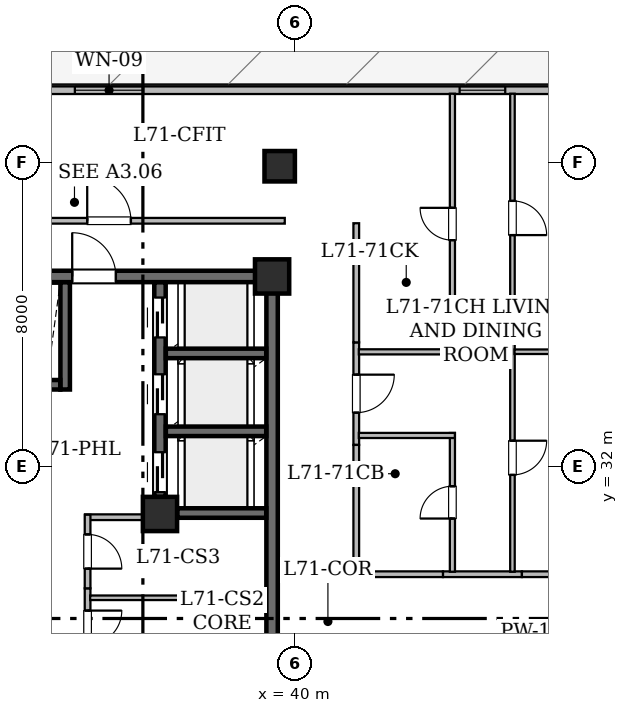
"""IFC4 building model, lengths in metres.
Left out: names, types, materials, properties, quantities, classifications, styles, units other than length and angle.
Written with IfcOpenShell. Run it as: python <this file> out.ifc"""

import sys

from ifc_helpers import new_model, si_unit, direction, frame, frame_2d, origin, origin_2d, place, context, subcontext, project, spatial, rectangle, hollow_rectangle, extrude, element, fill, save


model = new_model("IFC4")
c1 = context("Model", 3, precision=1e-05, world=origin(), true_north=direction((0.0, 1.0)))
c2 = subcontext(c1, "Body", "Model", "MODEL_VIEW")
j1 = project(units=[si_unit("LENGTHUNIT", "METRE"), si_unit("PLANEANGLEUNIT", "RADIAN")], contexts=[c1])
p1 = place(None, origin())
s1 = spatial("IfcSite", under=j1, at=p1, CompositionType="ELEMENT")
p2 = place(p1, origin())
s2 = spatial("IfcBuilding", under=s1, at=p2, CompositionType="ELEMENT")
p3 = place(p2, frame((0.0, 0.0, 277.85)))
s3 = spatial("IfcBuildingStorey", under=s2, at=p3, CompositionType="ELEMENT", Elevation=277.85)
for number, where, z_axis, x_axis in (
    (1, (36.45, 30.75, 0.0), (0.0, 0.0, 1.0), (1.0, 0.0, 0.0)),
    (2, (39.4, 37.0, 0.0), (0.0, 0.0, 1.0), (1.0, 0.0, 0.0)),
):
    element("IfcColumn", number, at=place(p3, frame(where, z_axis=z_axis, x_axis=x_axis)), inside=s3, PredefinedType="COLUMN", context=c2, shape_type="SweptSolid", body=[
        extrude(hollow_rectangle(XDim=0.9, YDim=0.9, WallThickness=0.045, at=origin_2d()), origin(), (0.0, 0.0, 1.0), 4.2),
    ])
p4 = place(p3, frame((39.6, 39.9, 0.025), z_axis=(0.0, 0.0, 1.0), x_axis=(1.0, 0.0, 0.0)))
e3 = element("IfcColumn", 3, at=p4, inside=s3, PredefinedType="COLUMN", context=c2, shape_type="SweptSolid", body=[
    extrude(hollow_rectangle(XDim=0.8, YDim=0.8, WallThickness=0.04, at=origin_2d()), origin(), (0.0, 0.0, 1.0), 4.175),
])
p5 = place(p3, frame((27.102, 41.9, 0.0), z_axis=(0.0, 0.0, 1.0), x_axis=(1.0, 0.0, 0.0)))
e4 = element("IfcWall", 4, at=p5, inside=s3, PredefinedType="STANDARD", context=c2, shape_type="SweptSolid", body=[
    extrude(rectangle(XDim=35.857, YDim=0.2, at=frame_2d((17.928, 0.0))), origin(), (0.0, 0.0, 1.0), 3.95),
])
p6 = place(p5, frame((20.417, 0.0, 0.0)))
e5 = element("IfcOpeningElement", 5, at=p6, cuts=e4, PredefinedType="OPENING", context=c2, shape_type="SweptSolid", body=[
    extrude(rectangle(XDim=1.0, YDim=2.15, at=frame_2d((0.5, 1.075))), frame((0.0, 0.11, 0.0), z_axis=(0.0, -1.0, 0.0), x_axis=(1.0, 0.0, 0.0)), (0.0, 0.0, 1.0), 0.22),
])
p7 = place(p5, frame((7.108, 0.0, 0.85)))
e6 = element("IfcOpeningElement", 6, at=p7, cuts=e4, PredefinedType="OPENING", context=c2, shape_type="SweptSolid", body=[
    extrude(rectangle(XDim=1.8, YDim=0.92, at=frame_2d((0.9, 0.46))), frame((0.0, 0.11, 0.0), z_axis=(0.0, -1.0, 0.0), x_axis=(1.0, 0.0, 0.0)), (0.0, 0.0, 1.0), 0.22),
])
p8 = place(p5, frame((17.233, 0.0, 0.78)))
e7 = element("IfcOpeningElement", 7, at=p8, cuts=e4, PredefinedType="OPENING", context=c2, shape_type="SweptSolid", body=[
    extrude(rectangle(XDim=1.2, YDim=1.5, at=frame_2d((0.6, 0.75))), frame((0.0, 0.11, 0.0), z_axis=(0.0, -1.0, 0.0), x_axis=(1.0, 0.0, 0.0)), (0.0, 0.0, 1.0), 0.22),
])
p9 = place(p5, frame((26.073, 0.0, 0.85)))
e8 = element("IfcOpeningElement", 8, at=p9, cuts=e4, PredefinedType="OPENING", context=c2, shape_type="SweptSolid", body=[
    extrude(rectangle(XDim=1.8, YDim=0.92, at=frame_2d((0.9, 0.46))), frame((0.0, 0.11, 0.0), z_axis=(0.0, -1.0, 0.0), x_axis=(1.0, 0.0, 0.0)), (0.0, 0.0, 1.0), 0.22),
])
p10 = place(p3, frame((29.0, 37.0, 0.0), z_axis=(0.0, 0.0, 1.0), x_axis=(1.0, 0.0, 0.0)))
e9 = element("IfcWall", 9, at=p10, inside=s3, PredefinedType="SHEAR", context=c2, shape_type="SweptSolid", body=[
    extrude(rectangle(XDim=10.4, YDim=0.3, at=frame_2d((5.2, 0.0))), origin(), (0.0, 0.0, 1.0), 3.95),
])
p11 = place(p10, frame((5.14, 0.0, 0.0)))
e10 = element("IfcOpeningElement", 10, at=p11, cuts=e9, PredefinedType="OPENING", context=c2, shape_type="SweptSolid", body=[
    extrude(rectangle(XDim=1.15, YDim=2.2, at=frame_2d((0.575, 1.1))), frame((0.0, 0.16, 0.0), z_axis=(0.0, -1.0, 0.0), x_axis=(1.0, 0.0, 0.0)), (0.0, 0.0, 1.0), 0.32),
])
p12 = place(p3, frame((39.4, 24.4, 0.0), z_axis=(0.0, 0.0, 1.0), x_axis=(0.0, 1.0, 0.0)))
e11 = element("IfcWall", 11, at=p12, inside=s3, PredefinedType="SHEAR", context=c2, shape_type="SweptSolid", body=[
    extrude(rectangle(XDim=12.6, YDim=0.3, at=frame_2d((6.3, 0.0))), origin(), (0.0, 0.0, 1.0), 3.95),
])
p13 = place(p3, frame((36.45, 31.2, 0.0), z_axis=(0.0, 0.0, 1.0), x_axis=(0.0, 1.0, 0.0)))
e12 = element("IfcWall", 12, at=p13, inside=s3, PredefinedType="SHEAR", context=c2, shape_type="SweptSolid", body=[
    extrude(rectangle(XDim=5.646, YDim=0.3, at=frame_2d((2.823, 0.0))), origin(), (0.0, 0.0, 1.0), 3.95),
])
p14 = place(p13, frame((0.125, 0.0, 0.0)))
e13 = element("IfcOpeningElement", 13, at=p14, cuts=e12, PredefinedType="OPENING", context=c2, shape_type="SweptSolid", body=[
    extrude(rectangle(XDim=1.05, YDim=2.15, at=frame_2d((0.525, 1.075))), frame((0.0, 0.16, 0.0), z_axis=(0.0, -1.0, 0.0), x_axis=(1.0, 0.0, 0.0)), (0.0, 0.0, 1.0), 0.32),
])
p15 = place(p13, frame((2.175, 0.0, 0.0)))
e14 = element("IfcOpeningElement", 14, at=p15, cuts=e12, PredefinedType="OPENING", context=c2, shape_type="SweptSolid", body=[
    extrude(rectangle(XDim=1.05, YDim=2.15, at=frame_2d((0.525, 1.075))), frame((0.0, 0.16, 0.0), z_axis=(0.0, -1.0, 0.0), x_axis=(1.0, 0.0, 0.0)), (0.0, 0.0, 1.0), 0.32),
])
p16 = place(p13, frame((4.195, 0.0, 0.0)))
e15 = element("IfcOpeningElement", 15, at=p16, cuts=e12, PredefinedType="OPENING", context=c2, shape_type="SweptSolid", body=[
    extrude(rectangle(XDim=1.05, YDim=2.15, at=frame_2d((0.525, 1.075))), frame((0.0, 0.16, 0.0), z_axis=(0.0, -1.0, 0.0), x_axis=(1.0, 0.0, 0.0)), (0.0, 0.0, 1.0), 0.32),
])
p17 = place(p3, frame((36.904, 30.775, 0.0), z_axis=(0.0, 0.0, 1.0), x_axis=(1.0, 0.0, 0.0)))
e16 = element("IfcWall", 16, at=p17, inside=s3, PredefinedType="SHEAR", context=c2, shape_type="SweptSolid", body=[
    extrude(rectangle(XDim=2.342, YDim=0.25, at=frame_2d((1.171, 0.0))), origin(), (0.0, 0.0, 1.0), 3.95),
])
for number, where, z_axis, x_axis in (
    (17, (36.604, 32.925, 0.0), (0.0, 0.0, 1.0), (1.0, 0.0, 0.0)),
    (18, (36.604, 34.975, 0.0), (0.0, 0.0, 1.0), (1.0, 0.0, 0.0)),
):
    element("IfcWall", number, at=place(p3, frame(where, z_axis=z_axis, x_axis=x_axis)), inside=s3, PredefinedType="SHEAR", context=c2, shape_type="SweptSolid", body=[
        extrude(rectangle(XDim=2.642, YDim=0.25, at=frame_2d((1.321, 0.0))), origin(), (0.0, 0.0, 1.0), 3.95),
    ])
p18 = place(p3, frame((33.955, 34.025, 0.0), z_axis=(0.0, 0.0, 1.0), x_axis=(0.0, 1.0, 0.0)))
e19 = element("IfcWall", 19, at=p18, inside=s3, PredefinedType="SHEAR", context=c2, shape_type="SweptSolid", body=[
    extrude(rectangle(XDim=2.821, YDim=0.25, at=frame_2d((1.411, 0.0))), origin(), (0.0, 0.0, 1.0), 3.95),
])
p19 = place(p3, frame((32.804, 34.15, 0.0), z_axis=(0.0, 0.0, 1.0), x_axis=(1.0, 0.0, 0.0)))
e20 = element("IfcWall", 20, at=p19, inside=s3, PredefinedType="SHEAR", context=c2, shape_type="SweptSolid", body=[
    extrude(rectangle(XDim=1.022, YDim=0.25, at=frame_2d((0.511, 0.0))), origin(), (0.0, 0.0, 1.0), 3.95),
])
p20 = place(p3, frame((34.545, 28.794, 0.0), z_axis=(0.0, 0.0, 1.0), x_axis=(0.0, -1.0, 0.0)))
e21 = element("IfcWall", 21, at=p20, inside=s3, PredefinedType="STANDARD", context=c2, shape_type="SweptSolid", body=[
    extrude(rectangle(XDim=2.03, YDim=0.15, at=frame_2d((1.015, 0.0))), origin(), (0.0, 0.0, 1.0), 3.95),
])
p21 = place(p20, frame((0.586, 0.0, 0.0)))
e22 = element("IfcOpeningElement", 22, at=p21, cuts=e21, PredefinedType="OPENING", context=c2, shape_type="SweptSolid", body=[
    extrude(rectangle(XDim=0.9, YDim=2.1, at=frame_2d((0.45, 1.05))), frame((0.0, 0.085, 0.0), z_axis=(0.0, -1.0, 0.0), x_axis=(1.0, 0.0, 0.0)), (0.0, 0.0, 1.0), 0.17),
])
p22 = place(p3, frame((36.3, 30.665, 0.0), z_axis=(0.0, 0.0, 1.0), x_axis=(-1.0, 0.0, 0.0)))
e23 = element("IfcWall", 23, at=p22, inside=s3, PredefinedType="STANDARD", context=c2, shape_type="SweptSolid", body=[
    extrude(rectangle(XDim=1.82, YDim=0.15, at=frame_2d((0.91, 0.0))), origin(), (0.0, 0.0, 1.0), 3.95),
])
p23 = place(p3, frame((34.545, 30.73, 0.0), z_axis=(0.0, 0.0, 1.0), x_axis=(0.0, -1.0, 0.0)))
e24 = element("IfcWall", 24, at=p23, inside=s3, PredefinedType="STANDARD", context=c2, shape_type="SweptSolid", body=[
    extrude(rectangle(XDim=1.936, YDim=0.15, at=frame_2d((0.968, 0.0))), origin(), (0.0, 0.0, 1.0), 3.95),
])
p24 = place(p23, frame((0.518, 0.0, 0.0)))
e25 = element("IfcOpeningElement", 25, at=p24, cuts=e24, PredefinedType="OPENING", context=c2, shape_type="SweptSolid", body=[
    extrude(rectangle(XDim=0.9, YDim=2.1, at=frame_2d((0.45, 1.05))), frame((0.0, 0.085, 0.0), z_axis=(0.0, -1.0, 0.0), x_axis=(1.0, 0.0, 0.0)), (0.0, 0.0, 1.0), 0.17),
])
p25 = place(p3, frame((34.612, 28.545, 0.0), z_axis=(0.0, 0.0, 1.0), x_axis=(1.0, 0.0, 0.0)))
e26 = element("IfcWall", 26, at=p25, inside=s3, PredefinedType="PARTITIONING", context=c2, shape_type="SweptSolid", body=[
    extrude(rectangle(XDim=4.644, YDim=0.12, at=frame_2d((2.322, 0.0))), origin(), (0.0, 0.0, 1.0), 3.95),
])
p26 = place(p3, frame((30.486, 38.465, 0.0), z_axis=(0.0, 0.0, 1.0), x_axis=(1.0, 0.0, 0.0)))
e27 = element("IfcWall", 27, at=p26, inside=s3, PredefinedType="STANDARD", context=c2, shape_type="SweptSolid", body=[
    extrude(rectangle(XDim=9.248, YDim=0.15, at=frame_2d((4.624, 0.0))), origin(), (0.0, 0.0, 1.0), 3.245),
])
p27 = place(p26, frame((4.049, 0.0, 0.0)))
e28 = element("IfcOpeningElement", 28, at=p27, cuts=e27, PredefinedType="OPENING", context=c2, shape_type="SweptSolid", body=[
    extrude(rectangle(XDim=1.15, YDim=2.2, at=frame_2d((0.575, 1.1))), frame((0.0, 0.085, 0.0), z_axis=(0.0, -1.0, 0.0), x_axis=(1.0, 0.0, 0.0)), (0.0, 0.0, 1.0), 0.17),
])
p28 = place(p3, frame((43.896, 29.165, 0.0), z_axis=(0.0, 0.0, 1.0), x_axis=(1.0, 0.0, 0.0)))
e29 = element("IfcWall", 29, at=p28, inside=s3, PredefinedType="STANDARD", context=c2, shape_type="SweptSolid", body=[
    extrude(rectangle(XDim=2.078, YDim=0.15, at=frame_2d((1.039, 0.0))), origin(), (0.0, 0.0, 1.0), 3.95),
])
p29 = place(p3, frame((41.615, 35.265, 0.0), z_axis=(0.0, 0.0, 1.0), x_axis=(0.0, -1.0, 0.0)))
e30 = element("IfcWall", 30, at=p29, inside=s3, PredefinedType="STANDARD", context=c2, shape_type="SweptSolid", body=[
    extrude(rectangle(XDim=2.698, YDim=0.15, at=frame_2d((1.349, 0.0))), origin(), (0.0, 0.0, 1.0), 3.95),
])
p30 = place(p29, frame((0.849, 0.0, 0.0)))
e31 = element("IfcOpeningElement", 31, at=p30, cuts=e30, PredefinedType="OPENING", context=c2, shape_type="SweptSolid", body=[
    extrude(rectangle(XDim=1.0, YDim=2.15, at=frame_2d((0.5, 1.075))), frame((0.0, 0.085, 0.0), z_axis=(0.0, -1.0, 0.0), x_axis=(1.0, 0.0, 0.0)), (0.0, 0.0, 1.0), 0.17),
])
p31 = place(p3, frame((41.55, 29.165, 0.0), z_axis=(0.0, 0.0, 1.0), x_axis=(1.0, 0.0, 0.0)))
e32 = element("IfcWall", 32, at=p31, inside=s3, PredefinedType="STANDARD", context=c2, shape_type="SweptSolid", body=[
    extrude(rectangle(XDim=2.346, YDim=0.15, at=frame_2d((1.173, 0.0))), origin(), (0.0, 0.0, 1.0), 3.95),
])
p32 = place(p3, frame((41.615, 32.567, 0.0), z_axis=(0.0, 0.0, 1.0), x_axis=(0.0, -1.0, 0.0)))
e33 = element("IfcWall", 33, at=p32, inside=s3, PredefinedType="STANDARD", context=c2, shape_type="SweptSolid", body=[
    extrude(rectangle(XDim=3.465, YDim=0.15, at=frame_2d((1.732, 0.0))), origin(), (0.0, 0.0, 1.0), 3.95),
])
p33 = place(p3, frame((41.615, 38.4, 0.0), z_axis=(0.0, 0.0, 1.0), x_axis=(0.0, -1.0, 0.0)))
e34 = element("IfcWall", 34, at=p33, inside=s3, PredefinedType="STANDARD", context=c2, shape_type="SweptSolid", body=[
    extrude(rectangle(XDim=3.135, YDim=0.15, at=frame_2d((1.567, 0.0))), origin(), (0.0, 0.0, 1.0), 3.245),
])
p34 = place(p3, frame((45.974, 29.165, 0.0), z_axis=(0.0, 0.0, 1.0), x_axis=(1.0, 0.0, 0.0)))
e35 = element("IfcWall", 35, at=p34, inside=s3, PredefinedType="STANDARD", context=c2, shape_type="SweptSolid", body=[
    extrude(rectangle(XDim=4.77, YDim=0.15, at=frame_2d((2.385, 0.0))), origin(), (0.0, 0.0, 1.0), 3.245),
])
p35 = place(p3, frame((44.145, 29.23, 0.0), z_axis=(0.0, 0.0, 1.0), x_axis=(0.0, 1.0, 0.0)))
e36 = element("IfcWall", 36, at=p35, inside=s3, PredefinedType="PARTITIONING", context=c2, shape_type="SweptSolid", body=[
    extrude(rectangle(XDim=3.651, YDim=0.135, at=frame_2d((1.826, 0.0))), origin(), (0.0, 0.0, 1.0), 3.95),
])
p36 = place(p35, frame((1.4, 0.0, 0.0)))
e37 = element("IfcOpeningElement", 37, at=p36, cuts=e36, PredefinedType="OPENING", context=c2, shape_type="SweptSolid", body=[
    extrude(rectangle(XDim=0.85, YDim=2.1, at=frame_2d((0.425, 1.05))), frame((0.0, 0.077, 0.0), z_axis=(0.0, -1.0, 0.0), x_axis=(1.0, 0.0, 0.0)), (0.0, 0.0, 1.0), 0.155),
])
for number, where, z_axis, x_axis in (
    (38, (44.21, 32.816, 0.0), (0.0, 0.0, 1.0), (-1.0, 0.0, 0.0)),
    (39, (41.682, 35.016, 0.0), (0.0, 0.0, 1.0), (1.0, 0.0, 0.0)),
):
    element("IfcWall", number, at=place(p3, frame(where, z_axis=z_axis, x_axis=x_axis)), inside=s3, PredefinedType="PARTITIONING", context=c2, shape_type="SweptSolid", body=[
        extrude(rectangle(XDim=2.528, YDim=0.135, at=frame_2d((1.264, 0.0))), origin(), (0.0, 0.0, 1.0), 3.95),
    ])
p37 = place(p3, frame((44.145, 34.951, 0.0), z_axis=(0.0, 0.0, 1.0), x_axis=(0.0, 1.0, 0.0)))
e40 = element("IfcWall", 40, at=p37, inside=s3, PredefinedType="PARTITIONING", context=c2, shape_type="SweptSolid", body=[
    extrude(rectangle(XDim=6.857, YDim=0.135, at=frame_2d((3.429, 0.0))), origin(), (0.0, 0.0, 1.0), 3.245),
])
p38 = place(p37, frame((3.004, 0.0, 0.0)))
e41 = element("IfcOpeningElement", 41, at=p38, cuts=e40, PredefinedType="OPENING", context=c2, shape_type="SweptSolid", body=[
    extrude(rectangle(XDim=0.85, YDim=2.1, at=frame_2d((0.425, 1.05))), frame((0.0, 0.077, 0.0), z_axis=(0.0, -1.0, 0.0), x_axis=(1.0, 0.0, 0.0)), (0.0, 0.0, 1.0), 0.155),
])
p39 = place(p3, frame((45.725, 35.268, 0.0), z_axis=(0.0, 0.0, 1.0), x_axis=(0.0, -1.0, 0.0)))
e42 = element("IfcWall", 42, at=p39, inside=s3, PredefinedType="PARTITIONING", context=c2, shape_type="SweptSolid", body=[
    extrude(rectangle(XDim=6.038, YDim=0.12, at=frame_2d((3.019, 0.0))), origin(), (0.0, 0.0, 1.0), 3.245),
])
p40 = place(p39, frame((2.59, 0.0, 0.0)))
e43 = element("IfcOpeningElement", 43, at=p40, cuts=e42, PredefinedType="OPENING", context=c2, shape_type="SweptSolid", body=[
    extrude(rectangle(XDim=0.9, YDim=2.1, at=frame_2d((0.45, 1.05))), frame((0.0, 0.07, 0.0), z_axis=(0.0, -1.0, 0.0), x_axis=(1.0, 0.0, 0.0)), (0.0, 0.0, 1.0), 0.14),
])
p41 = place(p3, frame((45.725, 41.808, 0.0), z_axis=(0.0, 0.0, 1.0), x_axis=(0.0, -1.0, 0.0)))
e44 = element("IfcWall", 44, at=p41, inside=s3, PredefinedType="PARTITIONING", context=c2, shape_type="SweptSolid", body=[
    extrude(rectangle(XDim=6.54, YDim=0.12, at=frame_2d((3.27, 0.0))), origin(), (0.0, 0.0, 1.0), 3.245),
])
p42 = place(p41, frame((2.82, 0.0, 0.0)))
e45 = element("IfcOpeningElement", 45, at=p42, cuts=e44, PredefinedType="OPENING", context=c2, shape_type="SweptSolid", body=[
    extrude(rectangle(XDim=0.9, YDim=2.1, at=frame_2d((0.45, 1.05))), frame((0.0, 0.07, 0.0), z_axis=(0.0, -1.0, 0.0), x_axis=(1.0, 0.0, 0.0)), (0.0, 0.0, 1.0), 0.14),
])
p43 = place(p3, frame((45.779, 35.019, 0.0), z_axis=(0.0, 0.0, 1.0), x_axis=(1.0, 0.0, 0.0)))
e46 = element("IfcWall", 46, at=p43, inside=s3, PredefinedType="PARTITIONING", context=c2, shape_type="SweptSolid", body=[
    extrude(rectangle(XDim=4.651, YDim=0.12, at=frame_2d((2.325, 0.0))), origin(), (0.0, 0.0, 1.0), 3.245),
])
p44 = place(p7, origin())
e47 = element("IfcWindow", 47, at=p44, inside=s3, PartitioningType="SINGLE_PANEL", PredefinedType="WINDOW", context=c2, shape_type="SweptSolid", body=[
    extrude(rectangle(XDim=1.8, YDim=0.92, at=frame_2d((0.9, 0.46))), frame((0.0, 0.03, 0.0), z_axis=(0.0, -1.0, 0.0), x_axis=(1.0, 0.0, 0.0)), (0.0, 0.0, 1.0), 0.06),
])
fill(e6, e47)
p45 = place(p8, origin())
e48 = element("IfcWindow", 48, at=p45, inside=s3, PartitioningType="SINGLE_PANEL", PredefinedType="WINDOW", context=c2, shape_type="SweptSolid", body=[
    extrude(rectangle(XDim=1.2, YDim=1.5, at=frame_2d((0.6, 0.75))), frame((0.0, 0.03, 0.0), z_axis=(0.0, -1.0, 0.0), x_axis=(1.0, 0.0, 0.0)), (0.0, 0.0, 1.0), 0.06),
])
fill(e7, e48)
p46 = place(p11, origin())
e49 = element("IfcDoor", 49, at=p46, inside=s3, OperationType="SINGLE_SWING_LEFT", PredefinedType="DOOR", context=c2, shape_type="SweptSolid", body=[
    extrude(rectangle(XDim=1.15, YDim=2.2, at=frame_2d((0.575, 1.1))), frame((0.0, 0.025, 0.0), z_axis=(0.0, -1.0, 0.0), x_axis=(1.0, 0.0, 0.0)), (0.0, 0.0, 1.0), 0.05),
])
fill(e10, e49)
p47 = place(p14, origin())
e50 = element("IfcDoor", 50, at=p47, inside=s3, OperationType="SLIDING_TO_LEFT", PredefinedType="DOOR", context=c2, shape_type="SweptSolid", body=[
    extrude(rectangle(XDim=1.05, YDim=2.15, at=frame_2d((0.525, 1.075))), frame((0.0, 0.025, 0.0), z_axis=(0.0, -1.0, 0.0), x_axis=(1.0, 0.0, 0.0)), (0.0, 0.0, 1.0), 0.05),
])
fill(e13, e50)
p48 = place(p15, origin())
e51 = element("IfcDoor", 51, at=p48, inside=s3, OperationType="SLIDING_TO_LEFT", PredefinedType="DOOR", context=c2, shape_type="SweptSolid", body=[
    extrude(rectangle(XDim=1.05, YDim=2.15, at=frame_2d((0.525, 1.075))), frame((0.0, 0.025, 0.0), z_axis=(0.0, -1.0, 0.0), x_axis=(1.0, 0.0, 0.0)), (0.0, 0.0, 1.0), 0.05),
])
fill(e14, e51)
p49 = place(p16, origin())
e52 = element("IfcDoor", 52, at=p49, inside=s3, OperationType="SLIDING_TO_LEFT", PredefinedType="DOOR", context=c2, shape_type="SweptSolid", body=[
    extrude(rectangle(XDim=1.05, YDim=2.15, at=frame_2d((0.525, 1.075))), frame((0.0, 0.025, 0.0), z_axis=(0.0, -1.0, 0.0), x_axis=(1.0, 0.0, 0.0)), (0.0, 0.0, 1.0), 0.05),
])
fill(e15, e52)
p50 = place(p21, origin())
e53 = element("IfcDoor", 53, at=p50, inside=s3, OperationType="SINGLE_SWING_LEFT", PredefinedType="DOOR", context=c2, shape_type="SweptSolid", body=[
    extrude(rectangle(XDim=0.9, YDim=2.1, at=frame_2d((0.45, 1.05))), frame((0.0, 0.025, 0.0), z_axis=(0.0, -1.0, 0.0), x_axis=(1.0, 0.0, 0.0)), (0.0, 0.0, 1.0), 0.05),
])
fill(e22, e53)
p51 = place(p24, origin())
e54 = element("IfcDoor", 54, at=p51, inside=s3, OperationType="SINGLE_SWING_RIGHT", PredefinedType="DOOR", context=c2, shape_type="SweptSolid", body=[
    extrude(rectangle(XDim=0.9, YDim=2.1, at=frame_2d((0.45, 1.05))), frame((0.0, 0.025, 0.0), z_axis=(0.0, -1.0, 0.0), x_axis=(1.0, 0.0, 0.0)), (0.0, 0.0, 1.0), 0.05),
])
fill(e25, e54)
p52 = place(p27, origin())
e55 = element("IfcDoor", 55, at=p52, inside=s3, OperationType="SINGLE_SWING_LEFT", PredefinedType="DOOR", context=c2, shape_type="SweptSolid", body=[
    extrude(rectangle(XDim=1.15, YDim=2.2, at=frame_2d((0.575, 1.1))), frame((0.0, 0.025, 0.0), z_axis=(0.0, -1.0, 0.0), x_axis=(1.0, 0.0, 0.0)), (0.0, 0.0, 1.0), 0.05),
])
fill(e28, e55)
p53 = place(p30, origin())
e56 = element("IfcDoor", 56, at=p53, inside=s3, OperationType="SINGLE_SWING_LEFT", PredefinedType="DOOR", context=c2, shape_type="SweptSolid", body=[
    extrude(rectangle(XDim=1.0, YDim=2.15, at=frame_2d((0.5, 1.075))), frame((0.0, 0.025, 0.0), z_axis=(0.0, -1.0, 0.0), x_axis=(1.0, 0.0, 0.0)), (0.0, 0.0, 1.0), 0.05),
])
fill(e31, e56)
p54 = place(p36, origin())
e57 = element("IfcDoor", 57, at=p54, inside=s3, OperationType="SINGLE_SWING_LEFT", PredefinedType="DOOR", context=c2, shape_type="SweptSolid", body=[
    extrude(rectangle(XDim=0.85, YDim=2.1, at=frame_2d((0.425, 1.05))), frame((0.0, 0.025, 0.0), z_axis=(0.0, -1.0, 0.0), x_axis=(1.0, 0.0, 0.0)), (0.0, 0.0, 1.0), 0.05),
])
fill(e37, e57)
p55 = place(p38, origin())
e58 = element("IfcDoor", 58, at=p55, inside=s3, OperationType="SINGLE_SWING_RIGHT", PredefinedType="DOOR", context=c2, shape_type="SweptSolid", body=[
    extrude(rectangle(XDim=0.85, YDim=2.1, at=frame_2d((0.425, 1.05))), frame((0.0, 0.025, 0.0), z_axis=(0.0, -1.0, 0.0), x_axis=(1.0, 0.0, 0.0)), (0.0, 0.0, 1.0), 0.05),
])
fill(e41, e58)
p56 = place(p40, origin())
e59 = element("IfcDoor", 59, at=p56, inside=s3, OperationType="SINGLE_SWING_LEFT", PredefinedType="DOOR", context=c2, shape_type="SweptSolid", body=[
    extrude(rectangle(XDim=0.9, YDim=2.1, at=frame_2d((0.45, 1.05))), frame((0.0, 0.025, 0.0), z_axis=(0.0, -1.0, 0.0), x_axis=(1.0, 0.0, 0.0)), (0.0, 0.0, 1.0), 0.05),
])
fill(e43, e59)
p57 = place(p42, origin())
e60 = element("IfcDoor", 60, at=p57, inside=s3, OperationType="SINGLE_SWING_RIGHT", PredefinedType="DOOR", context=c2, shape_type="SweptSolid", body=[
    extrude(rectangle(XDim=0.9, YDim=2.1, at=frame_2d((0.45, 1.05))), frame((0.0, 0.025, 0.0), z_axis=(0.0, -1.0, 0.0), x_axis=(1.0, 0.0, 0.0)), (0.0, 0.0, 1.0), 0.05),
])
fill(e45, e60)
save(model, sys.argv[1])
